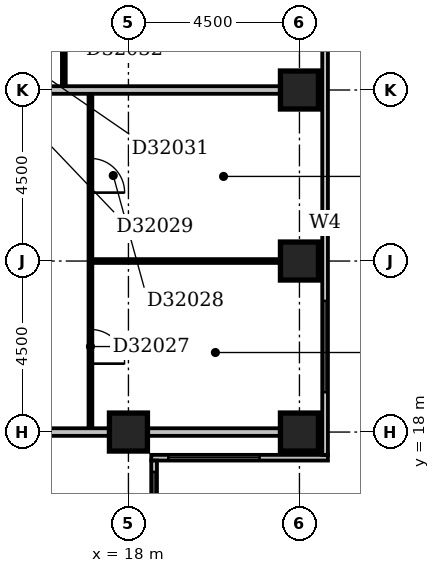
"""IFC4 building model, lengths in metres.
Left out: names, types, materials, properties, quantities, classifications, styles, units other than length and angle.
Written with IfcOpenShell. Run it as: python <this file> out.ifc"""

import sys

from ifc_helpers import new_model, si_unit, direction, frame, frame_2d, origin, origin_2d, place, context, subcontext, project, spatial, rectangle, extrude, element, fill, save


model = new_model("IFC4")
c1 = context("Model", 3, precision=1e-05, world=origin(), true_north=direction((0.0, 1.0)))
c2 = subcontext(c1, "Body", "Model", "MODEL_VIEW")
j1 = project(units=[si_unit("LENGTHUNIT", "METRE"), si_unit("PLANEANGLEUNIT", "RADIAN")], contexts=[c1])
p1 = place(None, origin())
s1 = spatial("IfcSite", under=j1, at=p1, CompositionType="ELEMENT")
p2 = place(p1, origin())
s2 = spatial("IfcBuilding", under=s1, at=p2, CompositionType="ELEMENT")
p3 = place(p2, frame((0.0, 0.0, 130.4)))
s3 = spatial("IfcBuildingStorey", under=s2, at=p3, CompositionType="ELEMENT", Elevation=130.4)
for number, where, z_axis, x_axis in (
    (1, (18.0, 18.0, -0.3), (0.0, 0.0, 1.0), (1.0, 0.0, 0.0)),
    (2, (22.5, 18.0, -0.3), (0.0, 0.0, 1.0), (1.0, 0.0, 0.0)),
    (3, (22.5, 22.5, -0.3), (0.0, 0.0, 1.0), (1.0, 0.0, 0.0)),
    (4, (22.5, 27.0, -0.3), (0.0, 0.0, 1.0), (1.0, 0.0, 0.0)),
):
    element("IfcColumn", number, at=place(p3, frame(where, z_axis=z_axis, x_axis=x_axis)), inside=s3, PredefinedType="COLUMN", context=c2, shape_type="SweptSolid", body=[
        extrude(rectangle(XDim=1.0, YDim=1.0, at=origin_2d()), origin(), (0.0, 0.0, 1.0), 3.6),
    ])
p4 = place(p3, frame((18.675, 8.4, 0.0), z_axis=(0.0, 0.0, 1.0), x_axis=(0.0, 1.0, 0.0)))
e5 = element("IfcWall", 5, at=p4, inside=s3, PredefinedType="STANDARD", context=c2, shape_type="SweptSolid", body=[
    extrude(rectangle(XDim=8.85, YDim=0.15, at=frame_2d((4.425, 0.0))), origin(), (0.0, 0.0, 1.0), 2.7),
])
p5 = place(p4, frame((1.342, 0.0, 0.6)))
e6 = element("IfcOpeningElement", 6, at=p5, cuts=e5, PredefinedType="OPENING", context=c2, shape_type="SweptSolid", body=[
    extrude(rectangle(XDim=1.8, YDim=1.8, at=frame_2d((0.9, 0.9))), frame((0.0, 0.087, 0.0), z_axis=(0.0, -1.0, 0.0), x_axis=(1.0, 0.0, 0.0)), (0.0, 0.0, 1.0), 0.174),
])
p6 = place(p4, frame((6.15, 0.0, 0.6)))
e7 = element("IfcOpeningElement", 7, at=p6, cuts=e5, PredefinedType="OPENING", context=c2, shape_type="SweptSolid", body=[
    extrude(rectangle(XDim=2.4, YDim=1.8, at=frame_2d((1.2, 0.9))), frame((0.0, 0.087, 0.0), z_axis=(0.0, -1.0, 0.0), x_axis=(1.0, 0.0, 0.0)), (0.0, 0.0, 1.0), 0.174),
])
p7 = place(p3, frame((18.6, 17.325, 0.0), z_axis=(0.0, 0.0, 1.0), x_axis=(1.0, 0.0, 0.0)))
e8 = element("IfcWall", 8, at=p7, inside=s3, PredefinedType="STANDARD", context=c2, shape_type="SweptSolid", body=[
    extrude(rectangle(XDim=4.65, YDim=0.15, at=frame_2d((2.325, 0.0))), origin(), (0.0, 0.0, 1.0), 2.7),
])
p8 = place(p7, frame((0.45, 0.0, 0.6)))
e9 = element("IfcOpeningElement", 9, at=p8, cuts=e8, PredefinedType="OPENING", context=c2, shape_type="SweptSolid", body=[
    extrude(rectangle(XDim=2.4, YDim=1.8, at=frame_2d((1.2, 0.9))), frame((0.0, 0.087, 0.0), z_axis=(0.0, -1.0, 0.0), x_axis=(1.0, 0.0, 0.0)), (0.0, 0.0, 1.0), 0.174),
])
p9 = place(p3, frame((23.175, 17.4, 0.0), z_axis=(0.0, 0.0, 1.0), x_axis=(0.0, 1.0, 0.0)))
e10 = element("IfcWall", 10, at=p9, inside=s3, PredefinedType="STANDARD", context=c2, shape_type="SweptSolid", body=[
    extrude(rectangle(XDim=17.85, YDim=0.15, at=frame_2d((8.925, 0.0))), origin(), (0.0, 0.0, 1.0), 2.7),
])
p10 = place(p9, frame((1.65, 0.0, 0.6)))
e11 = element("IfcOpeningElement", 11, at=p10, cuts=e10, PredefinedType="OPENING", context=c2, shape_type="SweptSolid", body=[
    extrude(rectangle(XDim=2.4, YDim=1.8, at=frame_2d((1.2, 0.9))), frame((0.0, 0.087, 0.0), z_axis=(0.0, -1.0, 0.0), x_axis=(1.0, 0.0, 0.0)), (0.0, 0.0, 1.0), 0.174),
])
p11 = place(p9, frame((5.801, 0.0, 0.6)))
e12 = element("IfcOpeningElement", 12, at=p11, cuts=e10, PredefinedType="OPENING", context=c2, shape_type="SweptSolid", body=[
    extrude(rectangle(XDim=0.6, YDim=1.8, at=frame_2d((0.3, 0.9))), frame((0.0, 0.087, 0.0), z_axis=(0.0, -1.0, 0.0), x_axis=(1.0, 0.0, 0.0)), (0.0, 0.0, 1.0), 0.174),
])
p12 = place(p9, frame((10.65, 0.0, 0.6)))
e13 = element("IfcOpeningElement", 13, at=p12, cuts=e10, PredefinedType="OPENING", context=c2, shape_type="SweptSolid", body=[
    extrude(rectangle(XDim=2.4, YDim=1.8, at=frame_2d((1.2, 0.9))), frame((0.0, 0.087, 0.0), z_axis=(0.0, -1.0, 0.0), x_axis=(1.0, 0.0, 0.0)), (0.0, 0.0, 1.0), 0.174),
])
p13 = place(p9, frame((15.15, 0.0, 0.6)))
e14 = element("IfcOpeningElement", 14, at=p13, cuts=e10, PredefinedType="OPENING", context=c2, shape_type="SweptSolid", body=[
    extrude(rectangle(XDim=2.4, YDim=1.8, at=frame_2d((1.2, 0.9))), frame((0.0, 0.087, 0.0), z_axis=(0.0, -1.0, 0.0), x_axis=(1.0, 0.0, 0.0)), (0.0, 0.0, 1.0), 0.174),
])
p14 = place(p3, frame((9.1, 18.0, 0.0), z_axis=(0.0, 0.0, 1.0), x_axis=(1.0, 0.0, 0.0)))
e15 = element("IfcWall", 15, at=p14, inside=s3, PredefinedType="PARTITIONING", context=c2, shape_type="SweptSolid", body=[
    extrude(rectangle(XDim=8.4, YDim=0.2, at=frame_2d((4.2, 0.0))), origin(), (0.0, 0.0, 1.0), 2.6),
])
p15 = place(p3, frame((18.5, 18.0, 0.0), z_axis=(0.0, 0.0, 1.0), x_axis=(1.0, 0.0, 0.0)))
e16 = element("IfcWall", 16, at=p15, inside=s3, PredefinedType="PARTITIONING", context=c2, shape_type="SweptSolid", body=[
    extrude(rectangle(XDim=3.5, YDim=0.2, at=frame_2d((1.75, 0.0))), origin(), (0.0, 0.0, 1.0), 2.7),
])
p16 = place(p3, frame((17.0, 18.1, 0.0), z_axis=(0.0, 0.0, 1.0), x_axis=(0.0, 1.0, 0.0)))
e17 = element("IfcWall", 17, at=p16, inside=s3, PredefinedType="PARTITIONING", context=c2, shape_type="SweptSolid", body=[
    extrude(rectangle(XDim=8.8, YDim=0.1, at=frame_2d((4.4, 0.0))), origin(), (0.0, 0.0, 1.0), 3.3),
])
p17 = place(p16, frame((1.7, 0.0, 0.0)))
e18 = element("IfcOpeningElement", 18, at=p17, cuts=e17, PredefinedType="OPENING", context=c2, shape_type="SweptSolid", body=[
    extrude(rectangle(XDim=0.9, YDim=2.1, at=frame_2d((0.45, 1.05))), frame((0.0, 0.062, 0.0), z_axis=(0.0, -1.0, 0.0), x_axis=(1.0, 0.0, 0.0)), (0.0, 0.0, 1.0), 0.124),
])
p18 = place(p16, frame((6.2, 0.0, 0.0)))
e19 = element("IfcOpeningElement", 19, at=p18, cuts=e17, PredefinedType="OPENING", context=c2, shape_type="SweptSolid", body=[
    extrude(rectangle(XDim=0.9, YDim=2.1, at=frame_2d((0.45, 1.05))), frame((0.0, 0.062, 0.0), z_axis=(0.0, -1.0, 0.0), x_axis=(1.0, 0.0, 0.0)), (0.0, 0.0, 1.0), 0.124),
])
p19 = place(p3, frame((17.05, 22.5, 0.0), z_axis=(0.0, 0.0, 1.0), x_axis=(1.0, 0.0, 0.0)))
e20 = element("IfcWall", 20, at=p19, inside=s3, PredefinedType="PARTITIONING", context=c2, shape_type="SweptSolid", body=[
    extrude(rectangle(XDim=4.95, YDim=0.1, at=frame_2d((2.475, 0.0))), origin(), (0.0, 0.0, 1.0), 3.3),
])
p20 = place(p3, frame((9.1, 27.0, 0.0), z_axis=(0.0, 0.0, 1.0), x_axis=(1.0, 0.0, 0.0)))
e21 = element("IfcWall", 21, at=p20, inside=s3, PredefinedType="PARTITIONING", context=c2, shape_type="SweptSolid", body=[
    extrude(rectangle(XDim=12.9, YDim=0.2, at=frame_2d((6.45, 0.0))), origin(), (0.0, 0.0, 1.0), 2.7),
])
p21 = place(p3, frame((16.3, 27.1, 0.0), z_axis=(0.0, 0.0, 1.0), x_axis=(0.0, 1.0, 0.0)))
e22 = element("IfcWall", 22, at=p21, inside=s3, PredefinedType="PARTITIONING", context=c2, shape_type="SweptSolid", body=[
    extrude(rectangle(XDim=4.3, YDim=0.1, at=frame_2d((2.15, 0.0))), origin(), (0.0, 0.0, 1.0), 3.3),
])
p22 = place(p21, frame((1.7, 0.0, 0.0)))
e23 = element("IfcOpeningElement", 23, at=p22, cuts=e22, PredefinedType="OPENING", context=c2, shape_type="SweptSolid", body=[
    extrude(rectangle(XDim=0.9, YDim=2.1, at=frame_2d((0.45, 1.05))), frame((0.0, 0.062, 0.0), z_axis=(0.0, -1.0, 0.0), x_axis=(1.0, 0.0, 0.0)), (0.0, 0.0, 1.0), 0.124),
])
p23 = place(p6, origin())
e24 = element("IfcWindow", 24, at=p23, inside=s3, PartitioningType="SINGLE_PANEL", PredefinedType="WINDOW", context=c2, shape_type="SweptSolid", body=[
    extrude(rectangle(XDim=2.4, YDim=1.8, at=frame_2d((1.2, 0.9))), frame((0.0, 0.03, 0.0), z_axis=(0.0, -1.0, 0.0), x_axis=(1.0, 0.0, 0.0)), (0.0, 0.0, 1.0), 0.06),
])
fill(e7, e24)
p24 = place(p8, origin())
e25 = element("IfcWindow", 25, at=p24, inside=s3, PartitioningType="SINGLE_PANEL", PredefinedType="WINDOW", context=c2, shape_type="SweptSolid", body=[
    extrude(rectangle(XDim=2.4, YDim=1.8, at=frame_2d((1.2, 0.9))), frame((0.0, 0.03, 0.0), z_axis=(0.0, -1.0, 0.0), x_axis=(1.0, 0.0, 0.0)), (0.0, 0.0, 1.0), 0.06),
])
fill(e9, e25)
p25 = place(p10, origin())
e26 = element("IfcWindow", 26, at=p25, inside=s3, PartitioningType="SINGLE_PANEL", PredefinedType="WINDOW", context=c2, shape_type="SweptSolid", body=[
    extrude(rectangle(XDim=2.4, YDim=1.8, at=frame_2d((1.2, 0.9))), frame((0.0, 0.03, 0.0), z_axis=(0.0, -1.0, 0.0), x_axis=(1.0, 0.0, 0.0)), (0.0, 0.0, 1.0), 0.06),
])
fill(e11, e26)
p26 = place(p11, origin())
e27 = element("IfcWindow", 27, at=p26, inside=s3, PartitioningType="SINGLE_PANEL", PredefinedType="WINDOW", context=c2, shape_type="SweptSolid", body=[
    extrude(rectangle(XDim=0.6, YDim=1.8, at=frame_2d((0.3, 0.9))), frame((0.0, 0.03, 0.0), z_axis=(0.0, -1.0, 0.0), x_axis=(1.0, 0.0, 0.0)), (0.0, 0.0, 1.0), 0.06),
])
fill(e12, e27)
p27 = place(p17, frame((0.9, 0.0, 0.0), z_axis=(0.0, 0.0, 1.0), x_axis=(-1.0, 0.0, 0.0)))
e28 = element("IfcDoor", 28, at=p27, inside=s3, OperationType="SINGLE_SWING_RIGHT", PredefinedType="DOOR", context=c2, shape_type="SweptSolid", body=[
    extrude(rectangle(XDim=0.9, YDim=2.1, at=frame_2d((0.45, 1.05))), frame((0.0, 0.025, 0.0), z_axis=(0.0, -1.0, 0.0), x_axis=(1.0, 0.0, 0.0)), (0.0, 0.0, 1.0), 0.05),
])
fill(e18, e28)
p28 = place(p18, frame((0.9, 0.0, 0.0), z_axis=(0.0, 0.0, 1.0), x_axis=(-1.0, 0.0, 0.0)))
e29 = element("IfcDoor", 29, at=p28, inside=s3, OperationType="SINGLE_SWING_RIGHT", PredefinedType="DOOR", context=c2, shape_type="SweptSolid", body=[
    extrude(rectangle(XDim=0.9, YDim=2.1, at=frame_2d((0.45, 1.05))), frame((0.0, 0.025, 0.0), z_axis=(0.0, -1.0, 0.0), x_axis=(1.0, 0.0, 0.0)), (0.0, 0.0, 1.0), 0.05),
])
fill(e19, e29)
save(model, sys.argv[1])
